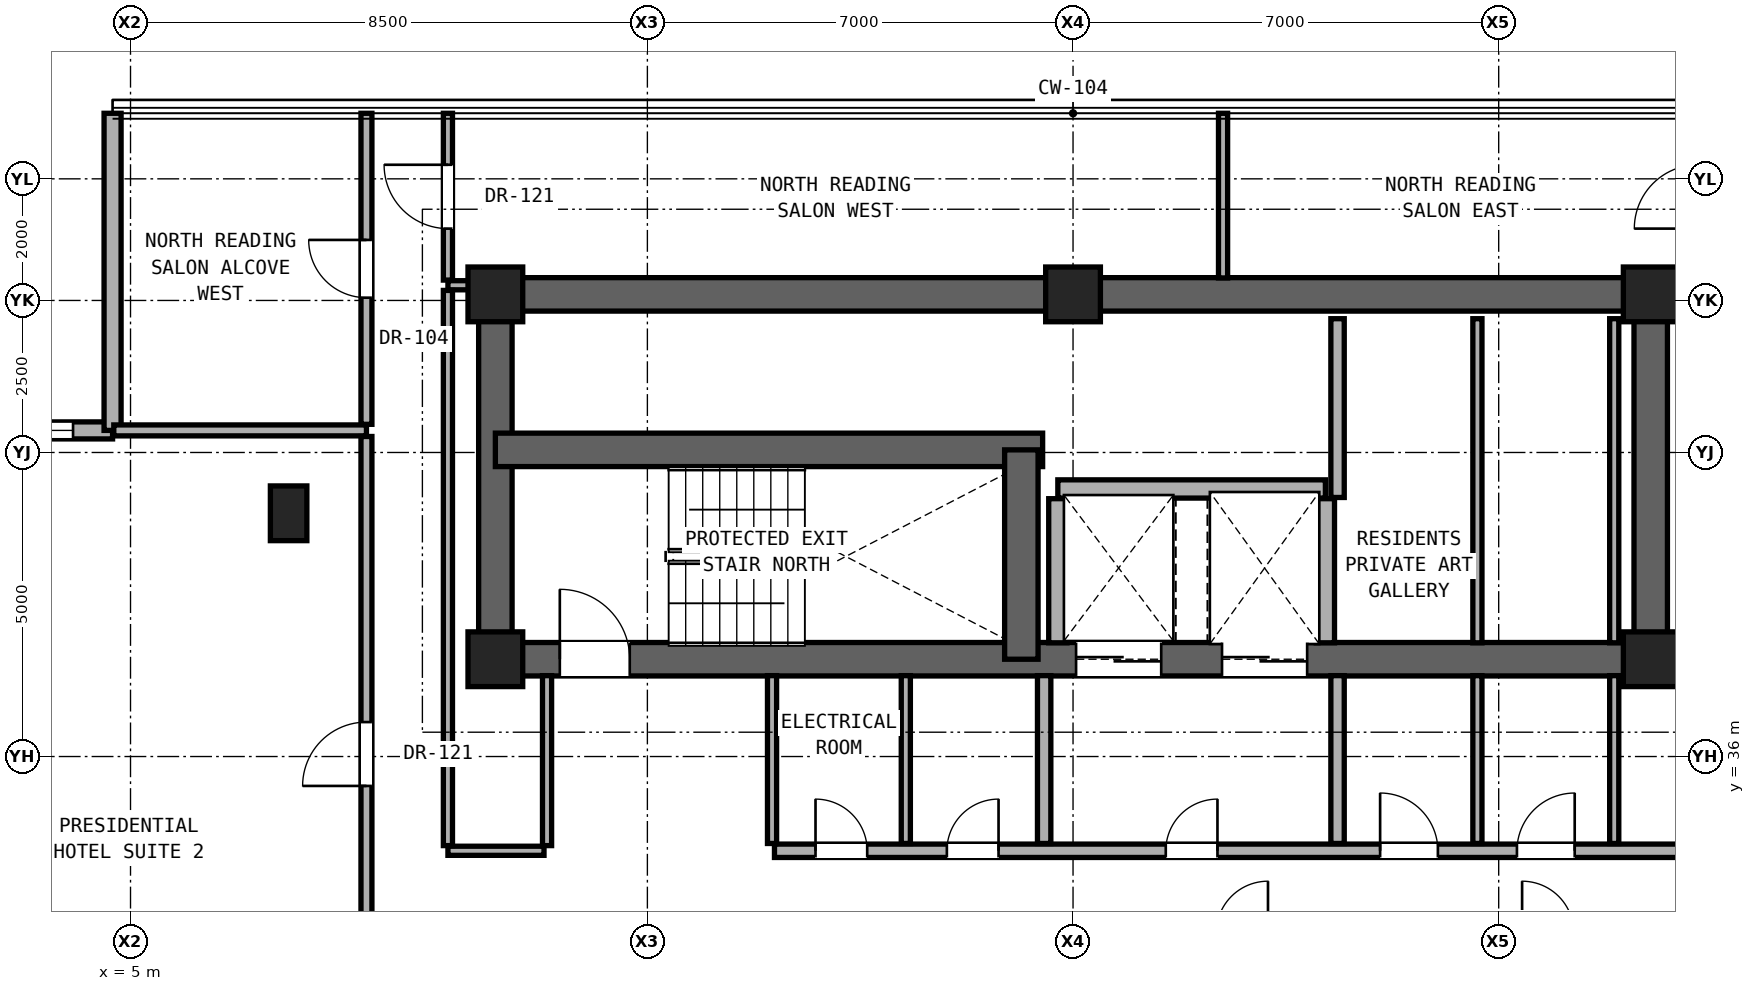
"""IFC4 building model, lengths in metres.
Left out: names, types, materials, properties, quantities, classifications, styles, units other than length and angle.
Written with IfcOpenShell. Run it as: python <this file> out.ifc"""

import sys

from ifc_helpers import new_model, si_unit, direction, frame, frame_2d, origin, origin_2d, place, context, subcontext, project, spatial, rectangle, extrude, element, fill, save


model = new_model("IFC4")
c1 = context("Model", 3, precision=1e-05, world=origin(), true_north=direction((0.0, 1.0)))
c2 = subcontext(c1, "Body", "Model", "MODEL_VIEW")
j1 = project(units=[si_unit("LENGTHUNIT", "METRE"), si_unit("PLANEANGLEUNIT", "RADIAN")], contexts=[c1])
p1 = place(None, origin())
s1 = spatial("IfcSite", under=j1, at=p1, CompositionType="ELEMENT")
p2 = place(p1, origin())
s2 = spatial("IfcBuilding", under=s1, at=p2, CompositionType="ELEMENT")
p3 = place(p2, frame((0.0, 0.0, 203.15)))
s3 = spatial("IfcBuildingStorey", under=s2, at=p3, CompositionType="ELEMENT", Elevation=203.15)
for number, where, z_axis, x_axis in (
    (1, (11.0, 37.6, 0.0), (0.0, 0.0, 1.0), (1.0, 0.0, 0.0)),
    (2, (30.0, 37.6, 0.0), (0.0, 0.0, 1.0), (1.0, 0.0, 0.0)),
    (3, (11.0, 43.6, 0.0), (0.0, 0.0, 1.0), (1.0, 0.0, 0.0)),
    (4, (20.5, 43.6, 0.0), (0.0, 0.0, 1.0), (1.0, 0.0, 0.0)),
    (5, (30.0, 43.6, 0.0), (0.0, 0.0, 1.0), (1.0, 0.0, 0.0)),
):
    element("IfcColumn", number, at=place(p3, frame(where, z_axis=z_axis, x_axis=x_axis)), inside=s3, PredefinedType="COLUMN", context=c2, shape_type="SweptSolid", body=[
        extrude(rectangle(XDim=0.9, YDim=0.9, at=origin_2d()), origin(), (0.0, 0.0, 1.0), 3.25),
    ])
p4 = place(p3, frame((7.6, 40.0, 0.0), z_axis=(0.0, 0.0, 1.0), x_axis=(1.0, 0.0, 0.0)))
e6 = element("IfcColumn", 6, at=p4, inside=s3, PredefinedType="PILASTER", context=c2, shape_type="SweptSolid", body=[
    extrude(rectangle(XDim=0.6, YDim=0.9, at=origin_2d()), origin(), (0.0, 0.0, 1.0), 3.25),
])
p5 = place(p3, frame((11.0, 43.6, 0.0), z_axis=(0.0, 0.0, 1.0), x_axis=(1.0, 0.0, 0.0)))
e7 = element("IfcWall", 7, at=p5, inside=s3, PredefinedType="SHEAR", context=c2, shape_type="SweptSolid", body=[
    extrude(rectangle(XDim=19.0, YDim=0.55, at=frame_2d((9.5, 0.0))), origin(), (0.0, 0.0, 1.0), 3.05),
])
for number, where, z_axis, x_axis in (
    (8, (11.0, 37.6, 0.0), (0.0, 0.0, 1.0), (0.0, 1.0, 0.0)),
    (9, (30.0, 37.6, 0.0), (0.0, 0.0, 1.0), (0.0, 1.0, 0.0)),
):
    element("IfcWall", number, at=place(p3, frame(where, z_axis=z_axis, x_axis=x_axis)), inside=s3, PredefinedType="SHEAR", context=c2, shape_type="SweptSolid", body=[
        extrude(rectangle(XDim=6.0, YDim=0.55, at=frame_2d((3.0, 0.0))), origin(), (0.0, 0.0, 1.0), 3.05),
    ])
p6 = place(p3, frame((11.0, 37.6, 0.0), z_axis=(0.0, 0.0, 1.0), x_axis=(1.0, 0.0, 0.0)))
e10 = element("IfcWall", 10, at=p6, inside=s3, PredefinedType="SHEAR", context=c2, shape_type="SweptSolid", body=[
    extrude(rectangle(XDim=19.0, YDim=0.55, at=frame_2d((9.5, 0.0))), origin(), (0.0, 0.0, 1.0), 3.05),
])
p7 = place(p6, frame((1.06, 0.0, 0.0)))
e11 = element("IfcOpeningElement", 11, at=p7, cuts=e10, PredefinedType="OPENING", context=c2, shape_type="SweptSolid", body=[
    extrude(rectangle(XDim=1.15, YDim=2.2, at=frame_2d((0.575, 1.1))), frame((0.0, 0.285, 0.0), z_axis=(0.0, -1.0, 0.0), x_axis=(1.0, 0.0, 0.0)), (0.0, 0.0, 1.0), 0.57),
])
p8 = place(p6, frame((9.55, 0.0, 0.0)))
e12 = element("IfcOpeningElement", 12, at=p8, cuts=e10, PredefinedType="OPENING", context=c2, shape_type="SweptSolid", body=[
    extrude(rectangle(XDim=1.4, YDim=2.35, at=frame_2d((0.7, 1.175))), frame((0.0, 0.285, 0.0), z_axis=(0.0, -1.0, 0.0), x_axis=(1.0, 0.0, 0.0)), (0.0, 0.0, 1.0), 0.57),
])
p9 = place(p6, frame((11.95, 0.0, 0.0)))
e13 = element("IfcOpeningElement", 13, at=p9, cuts=e10, PredefinedType="OPENING", context=c2, shape_type="SweptSolid", body=[
    extrude(rectangle(XDim=1.4, YDim=2.35, at=frame_2d((0.7, 1.175))), frame((0.0, 0.285, 0.0), z_axis=(0.0, -1.0, 0.0), x_axis=(1.0, 0.0, 0.0)), (0.0, 0.0, 1.0), 0.57),
])
p10 = place(p3, frame((11.0, 41.043, 0.0), z_axis=(0.0, 0.0, 1.0), x_axis=(1.0, 0.0, 0.0)))
e14 = element("IfcWall", 14, at=p10, inside=s3, PredefinedType="SHEAR", context=c2, shape_type="SweptSolid", body=[
    extrude(rectangle(XDim=9.0, YDim=0.55, at=frame_2d((4.5, 0.0))), origin(), (0.0, 0.0, 1.0), 3.05),
])
p11 = place(p3, frame((19.65, 37.6, 0.0), z_axis=(0.0, 0.0, 1.0), x_axis=(0.0, 1.0, 0.0)))
e15 = element("IfcWall", 15, at=p11, inside=s3, PredefinedType="SHEAR", context=c2, shape_type="SweptSolid", body=[
    extrude(rectangle(XDim=3.443, YDim=0.55, at=frame_2d((1.721, 0.0))), origin(), (0.0, 0.0, 1.0), 3.05),
])
p12 = place(p3, frame((4.705, 41.363, 0.0), z_axis=(0.0, 0.0, 1.0), x_axis=(-1.0, 0.0, 0.0)))
e16 = element("IfcWall", 16, at=p12, inside=s3, PredefinedType="SOLIDWALL", context=c2, shape_type="SweptSolid", body=[
    extrude(rectangle(XDim=5.215, YDim=0.28, at=frame_2d((2.607, 0.0))), origin(), (0.0, 0.0, 1.0), 3.03),
])
p13 = place(p12, frame((0.65, 0.0, 0.85)))
e17 = element("IfcOpeningElement", 17, at=p13, cuts=e16, PredefinedType="OPENING", context=c2, shape_type="SweptSolid", body=[
    extrude(rectangle(XDim=1.1, YDim=2.0, at=frame_2d((0.55, 1.0))), frame((0.0, 0.15, 0.0), z_axis=(0.0, -1.0, 0.0), x_axis=(1.0, 0.0, 0.0)), (0.0, 0.0, 1.0), 0.3),
])
p14 = place(p3, frame((4.705, 46.578, 0.0), z_axis=(0.0, 0.0, 1.0), x_axis=(0.0, -1.0, 0.0)))
e18 = element("IfcWall", 18, at=p14, inside=s3, PredefinedType="SOLIDWALL", context=c2, shape_type="SweptSolid", body=[
    extrude(rectangle(XDim=5.215, YDim=0.28, at=frame_2d((2.607, 0.0))), origin(), (0.0, 0.0, 1.0), 3.03),
])
p15 = place(p3, frame((10.22, 34.45, 0.0), z_axis=(0.0, 0.0, 1.0), x_axis=(1.0, 0.0, 0.0)))
e19 = element("IfcWall", 19, at=p15, inside=s3, PredefinedType="PARTITIONING", context=c2, shape_type="SweptSolid", body=[
    extrude(rectangle(XDim=1.58, YDim=0.15, at=frame_2d((0.79, 0.0))), origin(), (0.0, 0.0, 1.0), 2.186),
])
p16 = place(p3, frame((15.59, 34.45, 0.0), z_axis=(0.0, 0.0, 1.0), x_axis=(1.0, 0.0, 0.0)))
e20 = element("IfcWall", 20, at=p16, inside=s3, PredefinedType="SOLIDWALL", context=c2, shape_type="SweptSolid", body=[
    extrude(rectangle(XDim=15.19, YDim=0.22, at=frame_2d((7.595, 0.0))), origin(), (0.0, 0.0, 1.0), 2.186),
])
p17 = place(p16, frame((6.435, 0.0, 0.0)))
e21 = element("IfcOpeningElement", 21, at=p17, cuts=e20, PredefinedType="OPENING", context=c2, shape_type="SweptSolid", body=[
    extrude(rectangle(XDim=0.85, YDim=2.01, at=frame_2d((0.425, 1.005))), frame((0.0, 0.12, 0.0), z_axis=(0.0, -1.0, 0.0), x_axis=(1.0, 0.0, 0.0)), (0.0, 0.0, 1.0), 0.24),
])
p18 = place(p16, frame((9.96, 0.0, 0.0)))
e22 = element("IfcOpeningElement", 22, at=p18, cuts=e20, PredefinedType="OPENING", context=c2, shape_type="SweptSolid", body=[
    extrude(rectangle(XDim=0.95, YDim=2.15, at=frame_2d((0.475, 1.075))), frame((0.0, 0.12, 0.0), z_axis=(0.0, -1.0, 0.0), x_axis=(1.0, 0.0, 0.0)), (0.0, 0.0, 1.0), 0.24),
])
p19 = place(p16, frame((12.21, 0.0, 0.0)))
e23 = element("IfcOpeningElement", 23, at=p19, cuts=e20, PredefinedType="OPENING", context=c2, shape_type="SweptSolid", body=[
    extrude(rectangle(XDim=0.95, YDim=2.15, at=frame_2d((0.475, 1.075))), frame((0.0, 0.12, 0.0), z_axis=(0.0, -1.0, 0.0), x_axis=(1.0, 0.0, 0.0)), (0.0, 0.0, 1.0), 0.24),
])
p20 = place(p16, frame((0.675, 0.0, 0.0)))
e24 = element("IfcOpeningElement", 24, at=p20, cuts=e20, PredefinedType="OPENING", context=c2, shape_type="SweptSolid", body=[
    extrude(rectangle(XDim=0.85, YDim=2.01, at=frame_2d((0.425, 1.005))), frame((0.0, 0.12, 0.0), z_axis=(0.0, -1.0, 0.0), x_axis=(1.0, 0.0, 0.0)), (0.0, 0.0, 1.0), 0.24),
])
p21 = place(p16, frame((2.835, 0.0, 0.0)))
e25 = element("IfcOpeningElement", 25, at=p21, cuts=e20, PredefinedType="OPENING", context=c2, shape_type="SweptSolid", body=[
    extrude(rectangle(XDim=0.85, YDim=2.01, at=frame_2d((0.425, 1.005))), frame((0.0, 0.12, 0.0), z_axis=(0.0, -1.0, 0.0), x_axis=(1.0, 0.0, 0.0)), (0.0, 0.0, 1.0), 0.24),
])
p22 = place(p3, frame((20.25, 40.4, 0.0), z_axis=(0.0, 0.0, 1.0), x_axis=(1.0, 0.0, 0.0)))
e26 = element("IfcWall", 26, at=p22, inside=s3, PredefinedType="SOLIDWALL", context=c2, shape_type="SweptSolid", body=[
    extrude(rectangle(XDim=4.4, YDim=0.3, at=frame_2d((2.2, 0.0))), origin(), (0.0, 0.0, 1.0), 3.05),
])
p23 = place(p3, frame((4.725, 41.363, 0.0), z_axis=(0.0, 0.0, 1.0), x_axis=(1.0, 0.0, 0.0)))
e27 = element("IfcWall", 27, at=p23, inside=s3, PredefinedType="PARTITIONING", context=c2, shape_type="SweptSolid", body=[
    extrude(rectangle(XDim=4.155, YDim=0.18, at=frame_2d((2.077, 0.0))), origin(), (0.0, 0.0, 1.0), 3.05),
])
for number, where, z_axis, x_axis in (
    (28, (10.22, 43.75, 0.0), (0.0, 0.0, 1.0), (1.0, 0.0, 0.0)),
    (29, (30.27, 43.75, 0.0), (0.0, 0.0, 1.0), (1.0, 0.0, 0.0)),
):
    element("IfcWall", number, at=place(p3, frame(where, z_axis=z_axis, x_axis=x_axis)), inside=s3, PredefinedType="PARTITIONING", context=c2, shape_type="SweptSolid", body=[
        extrude(rectangle(XDim=0.51, YDim=0.15, at=frame_2d((0.255, 0.0))), origin(), (0.0, 0.0, 1.0), 3.05),
    ])
p24 = place(p3, frame((8.88, 30.82, 0.0), z_axis=(0.0, 0.0, 1.0), x_axis=(0.0, 1.0, 0.0)))
e30 = element("IfcWall", 30, at=p24, inside=s3, PredefinedType="PARTITIONING", context=c2, shape_type="SweptSolid", body=[
    extrude(rectangle(XDim=10.443, YDim=0.18, at=frame_2d((5.221, 0.0))), origin(), (0.0, 0.0, 1.0), 2.346),
])
p25 = place(p24, frame((4.697, 0.0, 0.0)))
e31 = element("IfcOpeningElement", 31, at=p25, cuts=e30, PredefinedType="OPENING", context=c2, shape_type="SweptSolid", body=[
    extrude(rectangle(XDim=1.05, YDim=2.2, at=frame_2d((0.525, 1.1))), frame((0.0, 0.1, 0.0), z_axis=(0.0, -1.0, 0.0), x_axis=(1.0, 0.0, 0.0)), (0.0, 0.0, 1.0), 0.2),
])
p26 = place(p3, frame((8.88, 41.463, 0.0), z_axis=(0.0, 0.0, 1.0), x_axis=(0.0, 1.0, 0.0)))
e32 = element("IfcWall", 32, at=p26, inside=s3, PredefinedType="PARTITIONING", context=c2, shape_type="SweptSolid", body=[
    extrude(rectangle(XDim=5.115, YDim=0.18, at=frame_2d((2.558, 0.0))), origin(), (0.0, 0.0, 1.0), 3.05),
])
p27 = place(p26, frame((2.083, 0.0, 0.0)))
e33 = element("IfcOpeningElement", 33, at=p27, cuts=e32, PredefinedType="OPENING", context=c2, shape_type="SweptSolid", body=[
    extrude(rectangle(XDim=0.95, YDim=2.15, at=frame_2d((0.475, 1.075))), frame((0.0, 0.1, 0.0), z_axis=(0.0, -1.0, 0.0), x_axis=(1.0, 0.0, 0.0)), (0.0, 0.0, 1.0), 0.2),
])
p28 = place(p3, frame((10.22, 34.535, 0.0), z_axis=(0.0, 0.0, 1.0), x_axis=(0.0, 1.0, 0.0)))
e34 = element("IfcWall", 34, at=p28, inside=s3, PredefinedType="PARTITIONING", context=c2, shape_type="SweptSolid", body=[
    extrude(rectangle(XDim=9.13, YDim=0.15, at=frame_2d((4.565, 0.0))), origin(), (0.0, 0.0, 1.0), 2.442),
])
p29 = place(p3, frame((10.22, 43.835, 0.0), z_axis=(0.0, 0.0, 1.0), x_axis=(0.0, 1.0, 0.0)))
e35 = element("IfcWall", 35, at=p29, inside=s3, PredefinedType="PARTITIONING", context=c2, shape_type="SweptSolid", body=[
    extrude(rectangle(XDim=2.743, YDim=0.15, at=frame_2d((1.372, 0.0))), origin(), (0.0, 0.0, 1.0), 3.05),
])
p30 = place(p29, frame((0.846, 0.0, 0.0)))
e36 = element("IfcOpeningElement", 36, at=p30, cuts=e35, PredefinedType="OPENING", context=c2, shape_type="SweptSolid", body=[
    extrude(rectangle(XDim=1.05, YDim=2.2, at=frame_2d((0.525, 1.1))), frame((0.0, 0.085, 0.0), z_axis=(0.0, -1.0, 0.0), x_axis=(1.0, 0.0, 0.0)), (0.0, 0.0, 1.0), 0.17),
])
p31 = place(p3, frame((11.85, 34.535, 0.0), z_axis=(0.0, 0.0, 1.0), x_axis=(0.0, 1.0, 0.0)))
e37 = element("IfcWall", 37, at=p31, inside=s3, PredefinedType="PARTITIONING", context=c2, shape_type="SweptSolid", body=[
    extrude(rectangle(XDim=2.795, YDim=0.15, at=frame_2d((1.397, 0.0))), origin(), (0.0, 0.0, 1.0), 3.05),
])
for number, where, z_axis, x_axis in (
    (38, (15.55, 34.57, 0.0), (0.0, 0.0, 1.0), (0.0, 1.0, 0.0)),
    (39, (17.75, 34.57, 0.0), (0.0, 0.0, 1.0), (0.0, 1.0, 0.0)),
):
    element("IfcWall", number, at=place(p3, frame(where, z_axis=z_axis, x_axis=x_axis)), inside=s3, PredefinedType="PARTITIONING", context=c2, shape_type="SweptSolid", body=[
        extrude(rectangle(XDim=2.76, YDim=0.15, at=frame_2d((1.38, 0.0))), origin(), (0.0, 0.0, 1.0), 3.05),
    ])
p32 = place(p3, frame((20.025, 34.57, 0.0), z_axis=(0.0, 0.0, 1.0), x_axis=(0.0, 1.0, 0.0)))
e40 = element("IfcWall", 40, at=p32, inside=s3, PredefinedType="SOLIDWALL", context=c2, shape_type="SweptSolid", body=[
    extrude(rectangle(XDim=2.76, YDim=0.22, at=frame_2d((1.38, 0.0))), origin(), (0.0, 0.0, 1.0), 3.05),
])
p33 = place(p3, frame((20.25, 37.87, 0.0), z_axis=(0.0, 0.0, 1.0), x_axis=(0.0, 1.0, 0.0)))
e41 = element("IfcWall", 41, at=p33, inside=s3, PredefinedType="SOLIDWALL", context=c2, shape_type="SweptSolid", body=[
    extrude(rectangle(XDim=2.37, YDim=0.3, at=frame_2d((1.185, 0.0))), origin(), (0.0, 0.0, 1.0), 3.05),
])
p34 = place(p3, frame((22.967, 43.87, 0.0), z_axis=(0.0, 0.0, 1.0), x_axis=(0.0, 1.0, 0.0)))
e42 = element("IfcWall", 42, at=p34, inside=s3, PredefinedType="PARTITIONING", context=c2, shape_type="SweptSolid", body=[
    extrude(rectangle(XDim=2.708, YDim=0.15, at=frame_2d((1.354, 0.0))), origin(), (0.0, 0.0, 1.0), 3.05),
])
p35 = place(p3, frame((24.65, 37.87, 0.0), z_axis=(0.0, 0.0, 1.0), x_axis=(0.0, 1.0, 0.0)))
e43 = element("IfcWall", 43, at=p35, inside=s3, PredefinedType="SOLIDWALL", context=c2, shape_type="SweptSolid", body=[
    extrude(rectangle(XDim=2.37, YDim=0.3, at=frame_2d((1.185, 0.0))), origin(), (0.0, 0.0, 1.0), 3.05),
])
p36 = place(p3, frame((24.85, 34.57, 0.0), z_axis=(0.0, 0.0, 1.0), x_axis=(0.0, 1.0, 0.0)))
e44 = element("IfcWall", 44, at=p36, inside=s3, PredefinedType="SOLIDWALL", context=c2, shape_type="SweptSolid", body=[
    extrude(rectangle(XDim=2.76, YDim=0.22, at=frame_2d((1.38, 0.0))), origin(), (0.0, 0.0, 1.0), 3.05),
])
p37 = place(p3, frame((24.85, 40.26, 0.0), z_axis=(0.0, 0.0, 1.0), x_axis=(0.0, 1.0, 0.0)))
e45 = element("IfcWall", 45, at=p37, inside=s3, PredefinedType="SOLIDWALL", context=c2, shape_type="SweptSolid", body=[
    extrude(rectangle(XDim=2.94, YDim=0.22, at=frame_2d((1.47, 0.0))), origin(), (0.0, 0.0, 1.0), 3.05),
])
p38 = place(p3, frame((27.15, 34.57, 0.0), z_axis=(0.0, 0.0, 1.0), x_axis=(0.0, 1.0, 0.0)))
e46 = element("IfcWall", 46, at=p38, inside=s3, PredefinedType="PARTITIONING", context=c2, shape_type="SweptSolid", body=[
    extrude(rectangle(XDim=2.76, YDim=0.15, at=frame_2d((1.38, 0.0))), origin(), (0.0, 0.0, 1.0), 3.05),
])
p39 = place(p3, frame((27.15, 37.87, 0.0), z_axis=(0.0, 0.0, 1.0), x_axis=(0.0, 1.0, 0.0)))
e47 = element("IfcWall", 47, at=p39, inside=s3, PredefinedType="PARTITIONING", context=c2, shape_type="SweptSolid", body=[
    extrude(rectangle(XDim=5.33, YDim=0.15, at=frame_2d((2.665, 0.0))), origin(), (0.0, 0.0, 1.0), 3.05),
])
p40 = place(p3, frame((29.4, 34.57, 0.0), z_axis=(0.0, 0.0, 1.0), x_axis=(0.0, 1.0, 0.0)))
e48 = element("IfcWall", 48, at=p40, inside=s3, PredefinedType="PARTITIONING", context=c2, shape_type="SweptSolid", body=[
    extrude(rectangle(XDim=2.76, YDim=0.15, at=frame_2d((1.38, 0.0))), origin(), (0.0, 0.0, 1.0), 3.05),
])
p41 = place(p3, frame((29.4, 37.87, 0.0), z_axis=(0.0, 0.0, 1.0), x_axis=(0.0, 1.0, 0.0)))
e49 = element("IfcWall", 49, at=p41, inside=s3, PredefinedType="PARTITIONING", context=c2, shape_type="SweptSolid", body=[
    extrude(rectangle(XDim=5.33, YDim=0.15, at=frame_2d((2.665, 0.0))), origin(), (0.0, 0.0, 1.0), 3.05),
])
p42 = place(p13, origin())
e50 = element("IfcWindow", 50, at=p42, inside=s3, PartitioningType="SINGLE_PANEL", PredefinedType="WINDOW", context=c2, shape_type="SweptSolid", body=[
    extrude(rectangle(XDim=1.1, YDim=2.0, at=frame_2d((0.55, 1.0))), frame((0.0, 0.03, 0.0), z_axis=(0.0, -1.0, 0.0), x_axis=(1.0, 0.0, 0.0)), (0.0, 0.0, 1.0), 0.06),
])
fill(e17, e50)
p43 = place(p7, origin())
e51 = element("IfcDoor", 51, at=p43, inside=s3, OperationType="SINGLE_SWING_LEFT", PredefinedType="DOOR", context=c2, shape_type="SweptSolid", body=[
    extrude(rectangle(XDim=1.15, YDim=2.2, at=frame_2d((0.575, 1.1))), frame((0.0, 0.025, 0.0), z_axis=(0.0, -1.0, 0.0), x_axis=(1.0, 0.0, 0.0)), (0.0, 0.0, 1.0), 0.05),
])
fill(e11, e51)
p44 = place(p17, origin())
e52 = element("IfcDoor", 52, at=p44, inside=s3, OperationType="SINGLE_SWING_RIGHT", PredefinedType="DOOR", context=c2, shape_type="SweptSolid", body=[
    extrude(rectangle(XDim=0.85, YDim=2.01, at=frame_2d((0.425, 1.005))), frame((0.0, 0.025, 0.0), z_axis=(0.0, -1.0, 0.0), x_axis=(1.0, 0.0, 0.0)), (0.0, 0.0, 1.0), 0.05),
])
fill(e21, e52)
p45 = place(p18, origin())
e53 = element("IfcDoor", 53, at=p45, inside=s3, OperationType="SINGLE_SWING_LEFT", PredefinedType="DOOR", context=c2, shape_type="SweptSolid", body=[
    extrude(rectangle(XDim=0.95, YDim=2.15, at=frame_2d((0.475, 1.075))), frame((0.0, 0.025, 0.0), z_axis=(0.0, -1.0, 0.0), x_axis=(1.0, 0.0, 0.0)), (0.0, 0.0, 1.0), 0.05),
])
fill(e22, e53)
p46 = place(p19, origin())
e54 = element("IfcDoor", 54, at=p46, inside=s3, OperationType="SINGLE_SWING_RIGHT", PredefinedType="DOOR", context=c2, shape_type="SweptSolid", body=[
    extrude(rectangle(XDim=0.95, YDim=2.15, at=frame_2d((0.475, 1.075))), frame((0.0, 0.025, 0.0), z_axis=(0.0, -1.0, 0.0), x_axis=(1.0, 0.0, 0.0)), (0.0, 0.0, 1.0), 0.05),
])
fill(e23, e54)
p47 = place(p20, origin())
e55 = element("IfcDoor", 55, at=p47, inside=s3, OperationType="SINGLE_SWING_LEFT", PredefinedType="DOOR", context=c2, shape_type="SweptSolid", body=[
    extrude(rectangle(XDim=0.85, YDim=2.01, at=frame_2d((0.425, 1.005))), frame((0.0, 0.025, 0.0), z_axis=(0.0, -1.0, 0.0), x_axis=(1.0, 0.0, 0.0)), (0.0, 0.0, 1.0), 0.05),
])
fill(e24, e55)
p48 = place(p21, origin())
e56 = element("IfcDoor", 56, at=p48, inside=s3, OperationType="SINGLE_SWING_RIGHT", PredefinedType="DOOR", context=c2, shape_type="SweptSolid", body=[
    extrude(rectangle(XDim=0.85, YDim=2.01, at=frame_2d((0.425, 1.005))), frame((0.0, 0.025, 0.0), z_axis=(0.0, -1.0, 0.0), x_axis=(1.0, 0.0, 0.0)), (0.0, 0.0, 1.0), 0.05),
])
fill(e25, e56)
p49 = place(p25, origin())
e57 = element("IfcDoor", 57, at=p49, inside=s3, OperationType="SINGLE_SWING_LEFT", PredefinedType="DOOR", context=c2, shape_type="SweptSolid", body=[
    extrude(rectangle(XDim=1.05, YDim=2.2, at=frame_2d((0.525, 1.1))), frame((0.0, 0.025, 0.0), z_axis=(0.0, -1.0, 0.0), x_axis=(1.0, 0.0, 0.0)), (0.0, 0.0, 1.0), 0.05),
])
fill(e31, e57)
p50 = place(p30, origin())
e58 = element("IfcDoor", 58, at=p50, inside=s3, OperationType="SINGLE_SWING_RIGHT", PredefinedType="DOOR", context=c2, shape_type="SweptSolid", body=[
    extrude(rectangle(XDim=1.05, YDim=2.2, at=frame_2d((0.525, 1.1))), frame((0.0, 0.025, 0.0), z_axis=(0.0, -1.0, 0.0), x_axis=(1.0, 0.0, 0.0)), (0.0, 0.0, 1.0), 0.05),
])
fill(e36, e58)
p51 = place(p27, origin())
e59 = element("IfcDoor", 59, at=p51, inside=s3, OperationType="SINGLE_SWING_RIGHT", PredefinedType="DOOR", context=c2, shape_type="SweptSolid", body=[
    extrude(rectangle(XDim=0.95, YDim=2.15, at=frame_2d((0.475, 1.075))), frame((0.0, 0.025, 0.0), z_axis=(0.0, -1.0, 0.0), x_axis=(1.0, 0.0, 0.0)), (0.0, 0.0, 1.0), 0.05),
])
fill(e33, e59)
p52 = place(p8, origin())
e60 = element("IfcDoor", 60, at=p52, inside=s3, OperationType="DOUBLE_DOOR_SLIDING", PredefinedType="DOOR", context=c2, shape_type="SweptSolid", body=[
    extrude(rectangle(XDim=1.4, YDim=2.35, at=frame_2d((0.7, 1.175))), frame((0.0, 0.025, 0.0), z_axis=(0.0, -1.0, 0.0), x_axis=(1.0, 0.0, 0.0)), (0.0, 0.0, 1.0), 0.05),
])
fill(e12, e60)
p53 = place(p9, origin())
e61 = element("IfcDoor", 61, at=p53, inside=s3, OperationType="DOUBLE_DOOR_SLIDING", PredefinedType="DOOR", context=c2, shape_type="SweptSolid", body=[
    extrude(rectangle(XDim=1.4, YDim=2.35, at=frame_2d((0.7, 1.175))), frame((0.0, 0.025, 0.0), z_axis=(0.0, -1.0, 0.0), x_axis=(1.0, 0.0, 0.0)), (0.0, 0.0, 1.0), 0.05),
])
fill(e13, e61)
save(model, sys.argv[1])
